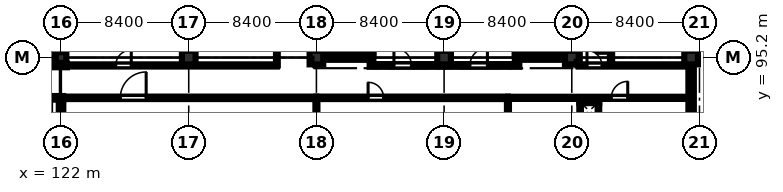
"""IFC4 building model, lengths in metres.
Left out: names, types, materials, properties, quantities, classifications, styles, units other than length and angle.
Written with IfcOpenShell. Run it as: python <this file> out.ifc"""

import sys

from ifc_helpers import new_model, si_unit, direction, frame, frame_2d, origin, origin_2d, place, context, subcontext, project, spatial, rectangle, extrude, element, fill, save


model = new_model("IFC4")
c1 = context("Model", 3, precision=1e-05, world=origin(), true_north=direction((0.0, 1.0)))
c2 = subcontext(c1, "Body", "Model", "MODEL_VIEW")
j1 = project(units=[si_unit("LENGTHUNIT", "METRE"), si_unit("PLANEANGLEUNIT", "RADIAN")], contexts=[c1])
p1 = place(None, origin())
s1 = spatial("IfcSite", under=j1, at=p1, CompositionType="ELEMENT")
p2 = place(p1, origin())
s2 = spatial("IfcBuilding", under=s1, at=p2, CompositionType="ELEMENT")
p3 = place(p2, frame((0.0, 0.0, 10.2)))
s3 = spatial("IfcBuildingStorey", under=s2, at=p3, CompositionType="ELEMENT", Elevation=10.2)
for number, where, z_axis, x_axis in (
    (1, (121.15, 95.2, 0.0), (0.0, 0.0, 1.0), (1.0, 0.0, 0.0)),
    (2, (122.0, 95.2, 0.0), (0.0, 0.0, 1.0), (1.0, 0.0, 0.0)),
):
    element("IfcColumn", number, at=place(p3, frame(where, z_axis=z_axis, x_axis=x_axis)), inside=s3, PredefinedType="COLUMN", context=c2, shape_type="SweptSolid", body=[
        extrude(rectangle(XDim=0.7, YDim=0.7, at=origin_2d()), origin(), (0.0, 0.0, 1.0), 4.26),
    ])
for number, where, z_axis, x_axis in (
    (3, (130.4, 95.2, 0.0), (0.0, 0.0, 1.0), (1.0, 0.0, 0.0)),
    (4, (138.8, 95.2, 0.0), (0.0, 0.0, 1.0), (1.0, 0.0, 0.0)),
    (5, (147.2, 95.2, 0.0), (0.0, 0.0, 1.0), (1.0, 0.0, 0.0)),
    (6, (155.6, 95.2, 0.0), (0.0, 0.0, 1.0), (1.0, 0.0, 0.0)),
    (7, (163.45, 95.2, 0.0), (0.0, 0.0, 1.0), (1.0, 0.0, 0.0)),
):
    element("IfcColumn", number, at=place(p3, frame(where, z_axis=z_axis, x_axis=x_axis)), inside=s3, PredefinedType="COLUMN", context=c2, shape_type="SweptSolid", body=[
        extrude(rectangle(XDim=0.9, YDim=0.9, at=origin_2d()), origin(), (0.0, 0.0, 1.0), 4.26),
    ])
p4 = place(p3, frame((138.65, 95.25, 0.0), z_axis=(0.0, 0.0, 1.0), x_axis=(1.0, 0.0, 0.0)))
e8 = element("IfcWall", 8, at=p4, inside=s3, PredefinedType="SHEAR", context=c2, shape_type="SweptSolid", body=[
    extrude(rectangle(XDim=3.9, YDim=0.4, at=frame_2d((1.95, 0.0))), origin(), (0.0, 0.0, 1.0), 4.26),
])
p5 = place(p3, frame((138.85, 95.45, 0.0), z_axis=(0.0, 0.0, 1.0), x_axis=(0.0, 1.0, 0.0)))
e9 = element("IfcWall", 9, at=p5, inside=s3, PredefinedType="SHEAR", context=c2, shape_type="SweptSolid", body=[
    extrude(rectangle(XDim=7.9, YDim=0.4, at=frame_2d((3.95, 0.0))), origin(), (0.0, 0.0, 1.0), 4.26),
])
p6 = place(p3, frame((142.35, 95.45, 0.0), z_axis=(0.0, 0.0, 1.0), x_axis=(0.0, 1.0, 0.0)))
e10 = element("IfcWall", 10, at=p6, inside=s3, PredefinedType="SHEAR", context=c2, shape_type="SweptSolid", body=[
    extrude(rectangle(XDim=7.9, YDim=0.4, at=frame_2d((3.95, 0.0))), origin(), (0.0, 0.0, 1.0), 4.26),
])
p7 = place(p6, frame((0.22, 0.0, 0.0)))
e11 = element("IfcOpeningElement", 11, at=p7, cuts=e10, PredefinedType="OPENING", context=c2, shape_type="SweptSolid", body=[
    extrude(rectangle(XDim=1.15, YDim=2.15, at=frame_2d((0.575, 1.075))), frame((0.0, 0.21, 0.0), z_axis=(0.0, -1.0, 0.0), x_axis=(1.0, 0.0, 0.0)), (0.0, 0.0, 1.0), 0.42),
])
p8 = place(p3, frame((151.85, 95.25, 0.0), z_axis=(0.0, 0.0, 1.0), x_axis=(1.0, 0.0, 0.0)))
e12 = element("IfcWall", 12, at=p8, inside=s3, PredefinedType="SHEAR", context=c2, shape_type="SweptSolid", body=[
    extrude(rectangle(XDim=3.9, YDim=0.4, at=frame_2d((1.95, 0.0))), origin(), (0.0, 0.0, 1.0), 4.26),
])
p9 = place(p3, frame((152.05, 95.45, 0.0), z_axis=(0.0, 0.0, 1.0), x_axis=(0.0, 1.0, 0.0)))
e13 = element("IfcWall", 13, at=p9, inside=s3, PredefinedType="SHEAR", context=c2, shape_type="SweptSolid", body=[
    extrude(rectangle(XDim=7.9, YDim=0.4, at=frame_2d((3.95, 0.0))), origin(), (0.0, 0.0, 1.0), 4.26),
])
p10 = place(p9, frame((0.35, 0.0, 0.0)))
e14 = element("IfcOpeningElement", 14, at=p10, cuts=e13, PredefinedType="OPENING", context=c2, shape_type="SweptSolid", body=[
    extrude(rectangle(XDim=1.15, YDim=2.15, at=frame_2d((0.575, 1.075))), frame((0.0, 0.21, 0.0), z_axis=(0.0, -1.0, 0.0), x_axis=(1.0, 0.0, 0.0)), (0.0, 0.0, 1.0), 0.42),
])
p11 = place(p3, frame((155.55, 95.45, 0.0), z_axis=(0.0, 0.0, 1.0), x_axis=(0.0, 1.0, 0.0)))
e15 = element("IfcWall", 15, at=p11, inside=s3, PredefinedType="SHEAR", context=c2, shape_type="SweptSolid", body=[
    extrude(rectangle(XDim=7.9, YDim=0.4, at=frame_2d((3.95, 0.0))), origin(), (0.0, 0.0, 1.0), 4.26),
])
p12 = place(p3, frame((163.45, 94.75, 0.0), z_axis=(0.0, 0.0, 1.0), x_axis=(0.0, -1.0, 0.0)))
e16 = element("IfcWall", 16, at=p12, inside=s3, PredefinedType="STANDARD", context=c2, shape_type="SweptSolid", body=[
    extrude(rectangle(XDim=7.5, YDim=0.36, at=frame_2d((3.75, 0.0))), origin(), (0.0, 0.0, 1.0), 3.51),
])
p13 = place(p12, frame((4.2, 0.0, 1.1)))
e17 = element("IfcOpeningElement", 17, at=p13, cuts=e16, PredefinedType="OPENING", context=c2, shape_type="SweptSolid", body=[
    extrude(rectangle(XDim=1.8, YDim=1.8, at=frame_2d((0.9, 0.9))), frame((0.0, 0.19, 0.0), z_axis=(0.0, -1.0, 0.0), x_axis=(1.0, 0.0, 0.0)), (0.0, 0.0, 1.0), 0.38),
])
p14 = place(p3, frame((122.0, 87.15, 0.0), z_axis=(0.0, 0.0, 1.0), x_axis=(0.0, 1.0, 0.0)))
e18 = element("IfcWall", 18, at=p14, inside=s3, PredefinedType="STANDARD", context=c2, shape_type="SweptSolid", body=[
    extrude(rectangle(XDim=5.27, YDim=0.3, at=frame_2d((2.635, 0.0))), origin(), (0.0, 0.0, 1.0), 3.51),
])
p15 = place(p3, frame((122.14, 92.55, 0.0), z_axis=(0.0, 0.0, 1.0), x_axis=(-1.0, 0.0, 0.0)))
e19 = element("IfcWall", 19, at=p15, inside=s3, PredefinedType="STANDARD", context=c2, shape_type="SweptSolid", body=[
    extrude(rectangle(XDim=1.11, YDim=0.24, at=frame_2d((0.555, 0.0))), origin(), (0.0, 0.0, 1.0), 4.26),
])
p16 = place(p3, frame((121.03, 94.68, 0.0), z_axis=(0.0, 0.0, 1.0), x_axis=(1.0, 0.0, 0.0)))
e20 = element("IfcWall", 20, at=p16, inside=s3, PredefinedType="STANDARD", context=c2, shape_type="SweptSolid", body=[
    extrude(rectangle(XDim=1.36, YDim=0.24, at=frame_2d((0.68, 0.0))), origin(), (0.0, 0.0, 1.0), 4.26),
])
p17 = place(p3, frame((122.0, 95.55, 0.0), z_axis=(0.0, 0.0, 1.0), x_axis=(0.0, 1.0, 0.0)))
e21 = element("IfcWall", 21, at=p17, inside=s3, PredefinedType="STANDARD", context=c2, shape_type="SweptSolid", body=[
    extrude(rectangle(XDim=7.7, YDim=0.3, at=frame_2d((3.85, 0.0))), origin(), (0.0, 0.0, 1.0), 3.51),
])
p18 = place(p3, frame((142.3, 94.68, 0.0), z_axis=(0.0, 0.0, 1.0), x_axis=(1.0, 0.0, 0.0)))
e22 = element("IfcWall", 22, at=p18, inside=s3, PredefinedType="STANDARD", context=c2, shape_type="SweptSolid", body=[
    extrude(rectangle(XDim=4.8, YDim=0.18, at=frame_2d((2.4, 0.0))), origin(), (0.0, 0.0, 1.0), 4.26),
])
p19 = place(p18, frame((1.6, 0.0, 0.0)))
e23 = element("IfcOpeningElement", 23, at=p19, cuts=e22, PredefinedType="OPENING", context=c2, shape_type="SweptSolid", body=[
    extrude(rectangle(XDim=1.15, YDim=2.15, at=frame_2d((0.575, 1.075))), frame((0.0, 0.1, 0.0), z_axis=(0.0, -1.0, 0.0), x_axis=(1.0, 0.0, 0.0)), (0.0, 0.0, 1.0), 0.2),
])
p20 = place(p3, frame((147.3, 94.68, 0.0), z_axis=(0.0, 0.0, 1.0), x_axis=(1.0, 0.0, 0.0)))
e24 = element("IfcWall", 24, at=p20, inside=s3, PredefinedType="STANDARD", context=c2, shape_type="SweptSolid", body=[
    extrude(rectangle(XDim=4.85, YDim=0.18, at=frame_2d((2.425, 0.0))), origin(), (0.0, 0.0, 1.0), 4.26),
])
p21 = place(p20, frame((1.6, 0.0, 0.0)))
e25 = element("IfcOpeningElement", 25, at=p21, cuts=e24, PredefinedType="OPENING", context=c2, shape_type="SweptSolid", body=[
    extrude(rectangle(XDim=1.15, YDim=2.15, at=frame_2d((0.575, 1.075))), frame((0.0, 0.1, 0.0), z_axis=(0.0, -1.0, 0.0), x_axis=(1.0, 0.0, 0.0)), (0.0, 0.0, 1.0), 0.2),
])
p22 = place(p3, frame((156.05, 94.68, 0.0), z_axis=(0.0, 0.0, 1.0), x_axis=(1.0, 0.0, 0.0)))
e26 = element("IfcWall", 26, at=p22, inside=s3, PredefinedType="PARTITIONING", context=c2, shape_type="SweptSolid", body=[
    extrude(rectangle(XDim=7.15, YDim=0.15, at=frame_2d((3.575, 0.0))), origin(), (0.0, 0.0, 1.0), 4.26),
])
p23 = place(p22, frame((0.55, 0.0, 0.0)))
e27 = element("IfcOpeningElement", 27, at=p23, cuts=e26, PredefinedType="OPENING", context=c2, shape_type="SweptSolid", body=[
    extrude(rectangle(XDim=0.98, YDim=2.12, at=frame_2d((0.49, 1.06))), frame((0.0, 0.085, 0.0), z_axis=(0.0, -1.0, 0.0), x_axis=(1.0, 0.0, 0.0)), (0.0, 0.0, 1.0), 0.17),
])
p24 = place(p3, frame((158.18, 94.68, 0.0), z_axis=(0.0, 0.0, 1.0), x_axis=(0.0, 1.0, 0.0)))
e28 = element("IfcWall", 28, at=p24, inside=s3, PredefinedType="PARTITIONING", context=c2, shape_type="SweptSolid", body=[
    extrude(rectangle(XDim=8.57, YDim=0.15, at=frame_2d((4.285, 0.0))), origin(), (0.0, 0.0, 1.0), 4.26),
])
p25 = place(p24, frame((0.8, 0.0, 0.0)))
e29 = element("IfcOpeningElement", 29, at=p25, cuts=e28, PredefinedType="OPENING", context=c2, shape_type="SweptSolid", body=[
    extrude(rectangle(XDim=1.0, YDim=2.12, at=frame_2d((0.5, 1.06))), frame((0.0, 0.085, 0.0), z_axis=(0.0, -1.0, 0.0), x_axis=(1.0, 0.0, 0.0)), (0.0, 0.0, 1.0), 0.17),
])
p26 = place(p24, frame((3.5, 0.0, 0.0)))
e30 = element("IfcOpeningElement", 30, at=p26, cuts=e28, PredefinedType="OPENING", context=c2, shape_type="SweptSolid", body=[
    extrude(rectangle(XDim=0.92, YDim=2.1, at=frame_2d((0.46, 1.05))), frame((0.0, 0.085, 0.0), z_axis=(0.0, -1.0, 0.0), x_axis=(1.0, 0.0, 0.0)), (0.0, 0.0, 1.0), 0.17),
])
p27 = place(p24, frame((6.4, 0.0, 0.0)))
e31 = element("IfcOpeningElement", 31, at=p27, cuts=e28, PredefinedType="OPENING", context=c2, shape_type="SweptSolid", body=[
    extrude(rectangle(XDim=0.92, YDim=2.1, at=frame_2d((0.46, 1.05))), frame((0.0, 0.085, 0.0), z_axis=(0.0, -1.0, 0.0), x_axis=(1.0, 0.0, 0.0)), (0.0, 0.0, 1.0), 0.17),
])
p28 = place(p3, frame((156.05, 94.68, 0.0), z_axis=(0.0, 0.0, 1.0), x_axis=(0.0, 1.0, 0.0)))
e32 = element("IfcWall", 32, at=p28, inside=s3, PredefinedType="PARTITIONING", context=c2, shape_type="SweptSolid", body=[
    extrude(rectangle(XDim=8.57, YDim=0.15, at=frame_2d((4.285, 0.0))), origin(), (0.0, 0.0, 1.0), 4.26),
])
p29 = place(p3, frame((136.2, 94.68, 0.0), z_axis=(0.0, 0.0, 1.0), x_axis=(0.0, 1.0, 0.0)))
e33 = element("IfcWall", 33, at=p29, inside=s3, PredefinedType="PARTITIONING", context=c2, shape_type="SweptSolid", body=[
    extrude(rectangle(XDim=9.07, YDim=0.12, at=frame_2d((4.535, 0.0))), origin(), (0.0, 0.0, 1.0), 4.26),
])
p30 = place(p3, frame((122.4, 94.68, 0.0), z_axis=(0.0, 0.0, 1.0), x_axis=(1.0, 0.0, 0.0)))
e34 = element("IfcWall", 34, at=p30, inside=s3, PredefinedType="PARTITIONING", context=c2, shape_type="SweptSolid", body=[
    extrude(rectangle(XDim=13.8, YDim=0.145, at=frame_2d((6.9, 0.0))), origin(), (0.0, 0.0, 1.0), 4.26),
])
p31 = place(p30, frame((3.2, 0.0, 0.0)))
e35 = element("IfcOpeningElement", 35, at=p31, cuts=e34, PredefinedType="OPENING", context=c2, shape_type="SweptSolid", body=[
    extrude(rectangle(XDim=1.02, YDim=2.15, at=frame_2d((0.51, 1.075))), frame((0.0, 0.083, 0.0), z_axis=(0.0, -1.0, 0.0), x_axis=(1.0, 0.0, 0.0)), (0.0, 0.0, 1.0), 0.165),
])
p32 = place(p3, frame((122.15, 92.55, 0.0), z_axis=(0.0, 0.0, 1.0), x_axis=(1.0, 0.0, 0.0)))
e36 = element("IfcWall", 36, at=p32, inside=s3, PredefinedType="PARTITIONING", context=c2, shape_type="SweptSolid", body=[
    extrude(rectangle(XDim=16.65, YDim=0.165, at=frame_2d((8.325, 0.0))), origin(), (0.0, 0.0, 1.0), 4.26),
])
p33 = place(p32, frame((3.75, 0.0, 0.0)))
e37 = element("IfcOpeningElement", 37, at=p33, cuts=e36, PredefinedType="OPENING", context=c2, shape_type="SweptSolid", body=[
    extrude(rectangle(XDim=1.7, YDim=2.2, at=frame_2d((0.85, 1.1))), frame((0.0, 0.093, 0.0), z_axis=(0.0, -1.0, 0.0), x_axis=(1.0, 0.0, 0.0)), (0.0, 0.0, 1.0), 0.185),
])
p34 = place(p3, frame((138.8, 92.55, 0.0), z_axis=(0.0, 0.0, 1.0), x_axis=(1.0, 0.0, 0.0)))
e38 = element("IfcWall", 38, at=p34, inside=s3, PredefinedType="PARTITIONING", context=c2, shape_type="SweptSolid", body=[
    extrude(rectangle(XDim=12.6, YDim=0.165, at=frame_2d((6.3, 0.0))), origin(), (0.0, 0.0, 1.0), 4.26),
])
p35 = place(p34, frame((3.4, 0.0, 0.0)))
e39 = element("IfcOpeningElement", 39, at=p35, cuts=e38, PredefinedType="OPENING", context=c2, shape_type="SweptSolid", body=[
    extrude(rectangle(XDim=1.02, YDim=2.15, at=frame_2d((0.51, 1.075))), frame((0.0, 0.093, 0.0), z_axis=(0.0, -1.0, 0.0), x_axis=(1.0, 0.0, 0.0)), (0.0, 0.0, 1.0), 0.185),
])
p36 = place(p3, frame((138.8, 78.55, 0.0), z_axis=(0.0, 0.0, 1.0), x_axis=(0.0, 1.0, 0.0)))
e40 = element("IfcWall", 40, at=p36, inside=s3, PredefinedType="PARTITIONING", context=c2, shape_type="SweptSolid", body=[
    extrude(rectangle(XDim=14.0, YDim=0.135, at=frame_2d((7.0, 0.0))), origin(), (0.0, 0.0, 1.0), 3.51),
])
p37 = place(p3, frame((151.4, 92.55, 0.0), z_axis=(0.0, 0.0, 1.0), x_axis=(1.0, 0.0, 0.0)))
e41 = element("IfcWall", 41, at=p37, inside=s3, PredefinedType="PARTITIONING", context=c2, shape_type="SweptSolid", body=[
    extrude(rectangle(XDim=11.95, YDim=0.145, at=frame_2d((5.975, 0.0))), origin(), (0.0, 0.0, 1.0), 4.26),
])
p38 = place(p37, frame((6.8, 0.0, 0.0)))
e42 = element("IfcOpeningElement", 42, at=p38, cuts=e41, PredefinedType="OPENING", context=c2, shape_type="SweptSolid", body=[
    extrude(rectangle(XDim=1.08, YDim=2.15, at=frame_2d((0.54, 1.075))), frame((0.0, 0.083, 0.0), z_axis=(0.0, -1.0, 0.0), x_axis=(1.0, 0.0, 0.0)), (0.0, 0.0, 1.0), 0.165),
])
p39 = place(p3, frame((151.4, 78.55, 0.0), z_axis=(0.0, 0.0, 1.0), x_axis=(0.0, 1.0, 0.0)))
e43 = element("IfcWall", 43, at=p39, inside=s3, PredefinedType="PARTITIONING", context=c2, shape_type="SweptSolid", body=[
    extrude(rectangle(XDim=14.0, YDim=0.135, at=frame_2d((7.0, 0.0))), origin(), (0.0, 0.0, 1.0), 3.71),
])
p40 = place(p3, frame((156.095, 92.252, 0.0), z_axis=(0.0, 0.0, 1.0), x_axis=(1.0, 0.0, 0.0)))
e44 = element("IfcWall", 44, at=p40, inside=s3, PredefinedType="PARTITIONING", context=c2, shape_type="SweptSolid", body=[
    extrude(rectangle(XDim=1.31, YDim=0.105, at=frame_2d((0.655, 0.0))), origin(), (0.0, 0.0, 1.0), 4.26),
])
for number, where, z_axis, x_axis in (
    (45, (156.147, 91.2, 0.0), (0.0, 0.0, 1.0), (0.0, 1.0, 0.0)),
    (46, (157.353, 91.2, 0.0), (0.0, 0.0, 1.0), (0.0, 1.0, 0.0)),
):
    element("IfcWall", number, at=place(p3, frame(where, z_axis=z_axis, x_axis=x_axis)), inside=s3, PredefinedType="PARTITIONING", context=c2, shape_type="SweptSolid", body=[
        extrude(rectangle(XDim=1.0, YDim=0.105, at=frame_2d((0.5, 0.0))), origin(), (0.0, 0.0, 1.0), 4.26),
    ])
p41 = place(p19, origin())
e47 = element("IfcDoor", 47, at=p41, inside=s3, OperationType="SINGLE_SWING_LEFT", PredefinedType="DOOR", context=c2, shape_type="SweptSolid", body=[
    extrude(rectangle(XDim=1.15, YDim=2.15, at=frame_2d((0.575, 1.075))), frame((0.0, 0.025, 0.0), z_axis=(0.0, -1.0, 0.0), x_axis=(1.0, 0.0, 0.0)), (0.0, 0.0, 1.0), 0.05),
])
fill(e23, e47)
p42 = place(p21, origin())
e48 = element("IfcDoor", 48, at=p42, inside=s3, OperationType="SINGLE_SWING_RIGHT", PredefinedType="DOOR", context=c2, shape_type="SweptSolid", body=[
    extrude(rectangle(XDim=1.15, YDim=2.15, at=frame_2d((0.575, 1.075))), frame((0.0, 0.025, 0.0), z_axis=(0.0, -1.0, 0.0), x_axis=(1.0, 0.0, 0.0)), (0.0, 0.0, 1.0), 0.05),
])
fill(e25, e48)
p43 = place(p23, origin())
e49 = element("IfcDoor", 49, at=p43, inside=s3, OperationType="SINGLE_SWING_LEFT", PredefinedType="DOOR", context=c2, shape_type="SweptSolid", body=[
    extrude(rectangle(XDim=0.98, YDim=2.12, at=frame_2d((0.49, 1.06))), frame((0.0, 0.025, 0.0), z_axis=(0.0, -1.0, 0.0), x_axis=(1.0, 0.0, 0.0)), (0.0, 0.0, 1.0), 0.05),
])
fill(e27, e49)
p44 = place(p25, origin())
e50 = element("IfcDoor", 50, at=p44, inside=s3, OperationType="SINGLE_SWING_LEFT", PredefinedType="DOOR", context=c2, shape_type="SweptSolid", body=[
    extrude(rectangle(XDim=1.0, YDim=2.12, at=frame_2d((0.5, 1.06))), frame((0.0, 0.025, 0.0), z_axis=(0.0, -1.0, 0.0), x_axis=(1.0, 0.0, 0.0)), (0.0, 0.0, 1.0), 0.05),
])
fill(e29, e50)
p45 = place(p31, origin())
e51 = element("IfcDoor", 51, at=p45, inside=s3, OperationType="SINGLE_SWING_RIGHT", PredefinedType="DOOR", context=c2, shape_type="SweptSolid", body=[
    extrude(rectangle(XDim=1.02, YDim=2.15, at=frame_2d((0.51, 1.075))), frame((0.0, 0.025, 0.0), z_axis=(0.0, -1.0, 0.0), x_axis=(1.0, 0.0, 0.0)), (0.0, 0.0, 1.0), 0.05),
])
fill(e35, e51)
p46 = place(p33, origin())
e52 = element("IfcDoor", 52, at=p46, inside=s3, OperationType="SINGLE_SWING_RIGHT", PredefinedType="DOOR", context=c2, shape_type="SweptSolid", body=[
    extrude(rectangle(XDim=1.7, YDim=2.2, at=frame_2d((0.85, 1.1))), frame((0.0, 0.025, 0.0), z_axis=(0.0, -1.0, 0.0), x_axis=(1.0, 0.0, 0.0)), (0.0, 0.0, 1.0), 0.05),
])
fill(e37, e52)
p47 = place(p35, origin())
e53 = element("IfcDoor", 53, at=p47, inside=s3, OperationType="SINGLE_SWING_LEFT", PredefinedType="DOOR", context=c2, shape_type="SweptSolid", body=[
    extrude(rectangle(XDim=1.02, YDim=2.15, at=frame_2d((0.51, 1.075))), frame((0.0, 0.025, 0.0), z_axis=(0.0, -1.0, 0.0), x_axis=(1.0, 0.0, 0.0)), (0.0, 0.0, 1.0), 0.05),
])
fill(e39, e53)
p48 = place(p38, origin())
e54 = element("IfcDoor", 54, at=p48, inside=s3, OperationType="SINGLE_SWING_RIGHT", PredefinedType="DOOR", context=c2, shape_type="SweptSolid", body=[
    extrude(rectangle(XDim=1.08, YDim=2.15, at=frame_2d((0.54, 1.075))), frame((0.0, 0.025, 0.0), z_axis=(0.0, -1.0, 0.0), x_axis=(1.0, 0.0, 0.0)), (0.0, 0.0, 1.0), 0.05),
])
fill(e42, e54)
save(model, sys.argv[1])
